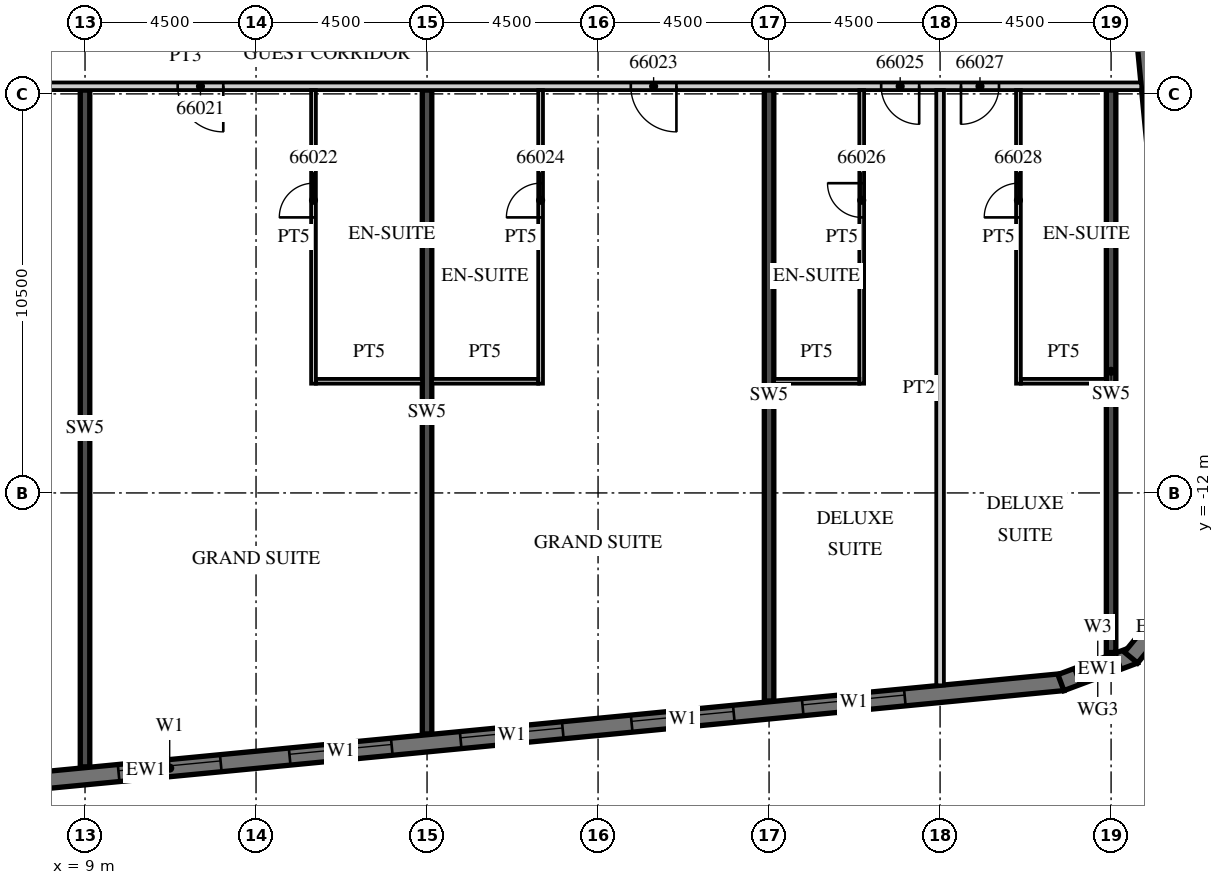
"""IFC4 building model, lengths in metres.
Left out: names, types, materials, properties, quantities, classifications, styles, units other than length and angle.
Written with IfcOpenShell. Run it as: python <this file> out.ifc"""

import sys

from ifc_helpers import new_model, si_unit, direction, frame, frame_2d, origin, place, context, subcontext, project, spatial, polyline, rectangle, outline, extrude, element, fill, save


model = new_model("IFC4")
c1 = context("Model", 3, precision=1e-05, world=origin(), true_north=direction((0.0, 1.0)))
c2 = subcontext(c1, "Body", "Model", "MODEL_VIEW")
j1 = project(units=[si_unit("LENGTHUNIT", "METRE"), si_unit("PLANEANGLEUNIT", "RADIAN")], contexts=[c1])
p1 = place(None, origin())
s1 = spatial("IfcSite", under=j1, at=p1, CompositionType="ELEMENT")
p2 = place(p1, origin())
s2 = spatial("IfcBuilding", under=s1, at=p2, CompositionType="ELEMENT")
p3 = place(p2, frame((0.0, 0.0, 268.5)))
s3 = spatial("IfcBuildingStorey", under=s2, at=p3, CompositionType="ELEMENT", Elevation=268.5)
p4 = place(p3, frame((9.0, -19.207, 0.0), z_axis=(0.0, 0.0, 1.0), x_axis=(0.0, 1.0, 0.0)))
e1 = element("IfcWall", 1, at=p4, inside=s3, PredefinedType="SHEAR", context=c2, shape_type="SweptSolid", body=[
    extrude(rectangle(XDim=17.807, YDim=0.25, at=frame_2d((8.904, 0.0))), origin(), (0.0, 0.0, 1.0), 3.3),
])
p5 = place(p3, frame((18.0, -18.341, 0.0), z_axis=(0.0, 0.0, 1.0), x_axis=(0.0, 1.0, 0.0)))
e2 = element("IfcWall", 2, at=p5, inside=s3, PredefinedType="SHEAR", context=c2, shape_type="SweptSolid", body=[
    extrude(rectangle(XDim=16.941, YDim=0.25, at=frame_2d((8.47, 0.0))), origin(), (0.0, 0.0, 1.0), 3.3),
])
p6 = place(p3, frame((27.0, -17.474, 0.0), z_axis=(0.0, 0.0, 1.0), x_axis=(0.0, 1.0, 0.0)))
e3 = element("IfcWall", 3, at=p6, inside=s3, PredefinedType="SHEAR", context=c2, shape_type="SweptSolid", body=[
    extrude(rectangle(XDim=16.074, YDim=0.25, at=frame_2d((8.037, 0.0))), origin(), (0.0, 0.0, 1.0), 3.3),
])
p7 = place(p3, frame((36.0, -16.199, 0.0), z_axis=(0.0, 0.0, 1.0), x_axis=(0.0, 1.0, 0.0)))
e4 = element("IfcWall", 4, at=p7, inside=s3, PredefinedType="SHEAR", context=c2, shape_type="SweptSolid", body=[
    extrude(rectangle(XDim=14.799, YDim=0.25, at=frame_2d((7.399, 0.0))), origin(), (0.0, 0.0, 1.0), 3.3),
])
p8 = place(p3, frame((-13.521, -21.624, 0.0), z_axis=(0.0, 0.0, 1.0), x_axis=(0.995396186218, 0.095845878695, 0.0)))
e5 = element("IfcWall", 5, at=p8, inside=s3, PredefinedType="SOLIDWALL", context=c2, shape_type="SweptSolid", body=[
    extrude(rectangle(XDim=48.481, YDim=0.45, at=frame_2d((24.241, 0.0))), origin(), (0.0, 0.0, 1.0), 3.02),
])
p9 = place(p8, frame((0.91, 0.0, 0.45)))
e6 = element("IfcOpeningElement", 6, at=p9, cuts=e5, PredefinedType="OPENING", context=c2, shape_type="SweptSolid", body=[
    extrude(rectangle(XDim=2.7, YDim=2.25, at=frame_2d((1.35, 1.125))), frame((0.0, 0.235, 0.0), z_axis=(0.0, -1.0, 0.0), x_axis=(1.0, 0.0, 0.0)), (0.0, 0.0, 1.0), 0.47),
])
p10 = place(p8, frame((5.431, 0.0, 0.45)))
e7 = element("IfcOpeningElement", 7, at=p10, cuts=e5, PredefinedType="OPENING", context=c2, shape_type="SweptSolid", body=[
    extrude(rectangle(XDim=2.7, YDim=2.25, at=frame_2d((1.35, 1.125))), frame((0.0, 0.235, 0.0), z_axis=(0.0, -1.0, 0.0), x_axis=(1.0, 0.0, 0.0)), (0.0, 0.0, 1.0), 0.47),
])
p11 = place(p8, frame((9.952, 0.0, 0.45)))
e8 = element("IfcOpeningElement", 8, at=p11, cuts=e5, PredefinedType="OPENING", context=c2, shape_type="SweptSolid", body=[
    extrude(rectangle(XDim=2.7, YDim=2.25, at=frame_2d((1.35, 1.125))), frame((0.0, 0.235, 0.0), z_axis=(0.0, -1.0, 0.0), x_axis=(1.0, 0.0, 0.0)), (0.0, 0.0, 1.0), 0.47),
])
p12 = place(p8, frame((14.473, 0.0, 0.45)))
e9 = element("IfcOpeningElement", 9, at=p12, cuts=e5, PredefinedType="OPENING", context=c2, shape_type="SweptSolid", body=[
    extrude(rectangle(XDim=2.7, YDim=2.25, at=frame_2d((1.35, 1.125))), frame((0.0, 0.235, 0.0), z_axis=(0.0, -1.0, 0.0), x_axis=(1.0, 0.0, 0.0)), (0.0, 0.0, 1.0), 0.47),
])
p13 = place(p8, frame((18.994, 0.0, 0.45)))
e10 = element("IfcOpeningElement", 10, at=p13, cuts=e5, PredefinedType="OPENING", context=c2, shape_type="SweptSolid", body=[
    extrude(rectangle(XDim=2.7, YDim=2.25, at=frame_2d((1.35, 1.125))), frame((0.0, 0.235, 0.0), z_axis=(0.0, -1.0, 0.0), x_axis=(1.0, 0.0, 0.0)), (0.0, 0.0, 1.0), 0.47),
])
p14 = place(p8, frame((23.514, 0.0, 0.45)))
e11 = element("IfcOpeningElement", 11, at=p14, cuts=e5, PredefinedType="OPENING", context=c2, shape_type="SweptSolid", body=[
    extrude(rectangle(XDim=2.7, YDim=2.25, at=frame_2d((1.35, 1.125))), frame((0.0, 0.235, 0.0), z_axis=(0.0, -1.0, 0.0), x_axis=(1.0, 0.0, 0.0)), (0.0, 0.0, 1.0), 0.47),
])
p15 = place(p8, frame((28.035, 0.0, 0.45)))
e12 = element("IfcOpeningElement", 12, at=p15, cuts=e5, PredefinedType="OPENING", context=c2, shape_type="SweptSolid", body=[
    extrude(rectangle(XDim=2.7, YDim=2.25, at=frame_2d((1.35, 1.125))), frame((0.0, 0.235, 0.0), z_axis=(0.0, -1.0, 0.0), x_axis=(1.0, 0.0, 0.0)), (0.0, 0.0, 1.0), 0.47),
])
p16 = place(p8, frame((32.556, 0.0, 0.45)))
e13 = element("IfcOpeningElement", 13, at=p16, cuts=e5, PredefinedType="OPENING", context=c2, shape_type="SweptSolid", body=[
    extrude(rectangle(XDim=2.7, YDim=2.25, at=frame_2d((1.35, 1.125))), frame((0.0, 0.235, 0.0), z_axis=(0.0, -1.0, 0.0), x_axis=(1.0, 0.0, 0.0)), (0.0, 0.0, 1.0), 0.47),
])
p17 = place(p8, frame((37.077, 0.0, 0.45)))
e14 = element("IfcOpeningElement", 14, at=p17, cuts=e5, PredefinedType="OPENING", context=c2, shape_type="SweptSolid", body=[
    extrude(rectangle(XDim=2.7, YDim=2.25, at=frame_2d((1.35, 1.125))), frame((0.0, 0.235, 0.0), z_axis=(0.0, -1.0, 0.0), x_axis=(1.0, 0.0, 0.0)), (0.0, 0.0, 1.0), 0.47),
])
p18 = place(p8, frame((41.598, 0.0, 0.45)))
e15 = element("IfcOpeningElement", 15, at=p18, cuts=e5, PredefinedType="OPENING", context=c2, shape_type="SweptSolid", body=[
    extrude(rectangle(XDim=2.7, YDim=2.25, at=frame_2d((1.35, 1.125))), frame((0.0, 0.235, 0.0), z_axis=(0.0, -1.0, 0.0), x_axis=(1.0, 0.0, 0.0)), (0.0, 0.0, 1.0), 0.47),
])
p19 = place(p3, frame((34.679, -16.99, 0.0), z_axis=(0.0, 0.0, 1.0), x_axis=(0.936677599948, 0.350192909346, 0.0)))
e16 = element("IfcWall", 16, at=p19, inside=s3, PredefinedType="SOLIDWALL", context=c2, shape_type="SweptSolid", body=[
    extrude(outline(polyline([(0.0, -0.225), (2.071, -0.225), (1.95, 0.225), (0.121, 0.225), (0.0, -0.225)])), origin(), (0.0, 0.0, 1.0), 3.02),
])
p20 = place(p19, frame((0.435, 0.0, 0.45)))
e17 = element("IfcOpeningElement", 17, at=p20, cuts=e16, PredefinedType="OPENING", context=c2, shape_type="SweptSolid", body=[
    extrude(rectangle(XDim=1.2, YDim=2.25, at=frame_2d((0.6, 1.125))), frame((0.0, 0.235, 0.0), z_axis=(0.0, -1.0, 0.0), x_axis=(1.0, 0.0, 0.0)), (0.0, 0.0, 1.0), 0.47),
])
p21 = place(p3, frame((36.524, -16.333, 0.0), z_axis=(0.0, 0.0, 1.0), x_axis=(0.636046112757, 0.771651049663, 0.0)))
e18 = element("IfcWall", 18, at=p21, inside=s3, PredefinedType="SOLIDWALL", context=c2, shape_type="SweptSolid", body=[
    extrude(outline(polyline([(0.0, -0.225), (2.071, -0.225), (1.95, 0.225), (0.121, 0.225), (0.0, -0.225)])), origin(), (0.0, 0.0, 1.0), 3.02),
])
p22 = place(p3, frame((38.132, -12.858, 0.0), z_axis=(0.0, 0.0, 1.0), x_axis=(-0.095847749461, 0.995396006082, 0.0)))
e19 = element("IfcWall", 19, at=p22, inside=s3, PredefinedType="SOLIDWALL", context=c2, shape_type="SweptSolid", body=[
    extrude(rectangle(XDim=32.0, YDim=0.45, at=frame_2d((16.0, 0.0))), origin(), (0.0, 0.0, 1.0), 3.02),
])
p23 = place(p3, frame((-13.5, -1.3, 0.0), z_axis=(0.0, 0.0, 1.0), x_axis=(1.0, 0.0, 0.0)))
e20 = element("IfcWall", 20, at=p23, inside=s3, PredefinedType="PARTITIONING", context=c2, shape_type="SweptSolid", body=[
    extrude(rectangle(XDim=50.293, YDim=0.2, at=frame_2d((25.146, 0.0))), origin(), (0.0, 0.0, 1.0), 3.02),
])
p24 = place(p23, frame((0.575, 0.0, 0.0)))
e21 = element("IfcOpeningElement", 21, at=p24, cuts=e20, PredefinedType="OPENING", context=c2, shape_type="SweptSolid", body=[
    extrude(rectangle(XDim=1.0, YDim=2.1, at=frame_2d((0.5, 1.05))), frame((0.0, 0.11, 0.0), z_axis=(0.0, -1.0, 0.0), x_axis=(1.0, 0.0, 0.0)), (0.0, 0.0, 1.0), 0.22),
])
p25 = place(p23, frame((6.938, 0.0, 0.0)))
e22 = element("IfcOpeningElement", 22, at=p25, cuts=e20, PredefinedType="OPENING", context=c2, shape_type="SweptSolid", body=[
    extrude(rectangle(XDim=1.2, YDim=2.1, at=frame_2d((0.6, 1.05))), frame((0.0, 0.11, 0.0), z_axis=(0.0, -1.0, 0.0), x_axis=(1.0, 0.0, 0.0)), (0.0, 0.0, 1.0), 0.22),
])
p26 = place(p23, frame((18.862, 0.0, 0.0)))
e23 = element("IfcOpeningElement", 23, at=p26, cuts=e20, PredefinedType="OPENING", context=c2, shape_type="SweptSolid", body=[
    extrude(rectangle(XDim=1.2, YDim=2.1, at=frame_2d((0.6, 1.05))), frame((0.0, 0.11, 0.0), z_axis=(0.0, -1.0, 0.0), x_axis=(1.0, 0.0, 0.0)), (0.0, 0.0, 1.0), 0.22),
])
p27 = place(p23, frame((24.938, 0.0, 0.0)))
e24 = element("IfcOpeningElement", 24, at=p27, cuts=e20, PredefinedType="OPENING", context=c2, shape_type="SweptSolid", body=[
    extrude(rectangle(XDim=1.2, YDim=2.1, at=frame_2d((0.6, 1.05))), frame((0.0, 0.11, 0.0), z_axis=(0.0, -1.0, 0.0), x_axis=(1.0, 0.0, 0.0)), (0.0, 0.0, 1.0), 0.22),
])
p28 = place(p23, frame((36.862, 0.0, 0.0)))
e25 = element("IfcOpeningElement", 25, at=p28, cuts=e20, PredefinedType="OPENING", context=c2, shape_type="SweptSolid", body=[
    extrude(rectangle(XDim=1.2, YDim=2.1, at=frame_2d((0.6, 1.05))), frame((0.0, 0.11, 0.0), z_axis=(0.0, -1.0, 0.0), x_axis=(1.0, 0.0, 0.0)), (0.0, 0.0, 1.0), 0.22),
])
p29 = place(p23, frame((43.45, 0.0, 0.0)))
e26 = element("IfcOpeningElement", 26, at=p29, cuts=e20, PredefinedType="OPENING", context=c2, shape_type="SweptSolid", body=[
    extrude(rectangle(XDim=1.0, YDim=2.1, at=frame_2d((0.5, 1.05))), frame((0.0, 0.11, 0.0), z_axis=(0.0, -1.0, 0.0), x_axis=(1.0, 0.0, 0.0)), (0.0, 0.0, 1.0), 0.22),
])
p30 = place(p23, frame((45.55, 0.0, 0.0)))
e27 = element("IfcOpeningElement", 27, at=p30, cuts=e20, PredefinedType="OPENING", context=c2, shape_type="SweptSolid", body=[
    extrude(rectangle(XDim=1.0, YDim=2.1, at=frame_2d((0.5, 1.05))), frame((0.0, 0.11, 0.0), z_axis=(0.0, -1.0, 0.0), x_axis=(1.0, 0.0, 0.0)), (0.0, 0.0, 1.0), 0.22),
])
p31 = place(p3, frame((15.012, -9.125, 0.0), z_axis=(0.0, 0.0, 1.0), x_axis=(0.0, 1.0, 0.0)))
e28 = element("IfcWall", 28, at=p31, inside=s3, PredefinedType="PARTITIONING", context=c2, shape_type="SweptSolid", body=[
    extrude(rectangle(XDim=7.725, YDim=0.125, at=frame_2d((3.863, 0.0))), origin(), (0.0, 0.0, 1.0), 3.02),
])
p32 = place(p31, frame((4.375, 0.0, 0.0)))
e29 = element("IfcOpeningElement", 29, at=p32, cuts=e28, PredefinedType="OPENING", context=c2, shape_type="SweptSolid", body=[
    extrude(rectangle(XDim=0.9, YDim=2.1, at=frame_2d((0.45, 1.05))), frame((0.0, 0.073, 0.0), z_axis=(0.0, -1.0, 0.0), x_axis=(1.0, 0.0, 0.0)), (0.0, 0.0, 1.0), 0.145),
])
p33 = place(p3, frame((15.075, -9.062, 0.0), z_axis=(0.0, 0.0, 1.0), x_axis=(1.0, 0.0, 0.0)))
e30 = element("IfcWall", 30, at=p33, inside=s3, PredefinedType="PARTITIONING", context=c2, shape_type="SweptSolid", body=[
    extrude(rectangle(XDim=2.8, YDim=0.125, at=frame_2d((1.4, 0.0))), origin(), (0.0, 0.0, 1.0), 3.02),
])
p34 = place(p3, frame((20.988, -9.125, 0.0), z_axis=(0.0, 0.0, 1.0), x_axis=(0.0, 1.0, 0.0)))
e31 = element("IfcWall", 31, at=p34, inside=s3, PredefinedType="PARTITIONING", context=c2, shape_type="SweptSolid", body=[
    extrude(rectangle(XDim=7.725, YDim=0.125, at=frame_2d((3.863, 0.0))), origin(), (0.0, 0.0, 1.0), 3.02),
])
p35 = place(p34, frame((4.375, 0.0, 0.0)))
e32 = element("IfcOpeningElement", 32, at=p35, cuts=e31, PredefinedType="OPENING", context=c2, shape_type="SweptSolid", body=[
    extrude(rectangle(XDim=0.9, YDim=2.1, at=frame_2d((0.45, 1.05))), frame((0.0, 0.073, 0.0), z_axis=(0.0, -1.0, 0.0), x_axis=(1.0, 0.0, 0.0)), (0.0, 0.0, 1.0), 0.145),
])
p36 = place(p3, frame((18.125, -9.062, 0.0), z_axis=(0.0, 0.0, 1.0), x_axis=(1.0, 0.0, 0.0)))
e33 = element("IfcWall", 33, at=p36, inside=s3, PredefinedType="PARTITIONING", context=c2, shape_type="SweptSolid", body=[
    extrude(rectangle(XDim=2.8, YDim=0.125, at=frame_2d((1.4, 0.0))), origin(), (0.0, 0.0, 1.0), 3.02),
])
p37 = place(p3, frame((31.5, -17.063, 0.0), z_axis=(0.0, 0.0, 1.0), x_axis=(0.0, 1.0, 0.0)))
e34 = element("IfcWall", 34, at=p37, inside=s3, PredefinedType="PARTITIONING", context=c2, shape_type="SweptSolid", body=[
    extrude(rectangle(XDim=15.663, YDim=0.2, at=frame_2d((7.832, 0.0))), origin(), (0.0, 0.0, 1.0), 3.02),
])
p38 = place(p3, frame((29.438, -9.125, 0.0), z_axis=(0.0, 0.0, 1.0), x_axis=(0.0, 1.0, 0.0)))
e35 = element("IfcWall", 35, at=p38, inside=s3, PredefinedType="PARTITIONING", context=c2, shape_type="SweptSolid", body=[
    extrude(rectangle(XDim=7.725, YDim=0.125, at=frame_2d((3.863, 0.0))), origin(), (0.0, 0.0, 1.0), 3.02),
])
p39 = place(p38, frame((4.375, 0.0, 0.0)))
e36 = element("IfcOpeningElement", 36, at=p39, cuts=e35, PredefinedType="OPENING", context=c2, shape_type="SweptSolid", body=[
    extrude(rectangle(XDim=0.9, YDim=2.1, at=frame_2d((0.45, 1.05))), frame((0.0, 0.073, 0.0), z_axis=(0.0, -1.0, 0.0), x_axis=(1.0, 0.0, 0.0)), (0.0, 0.0, 1.0), 0.145),
])
p40 = place(p3, frame((27.125, -9.062, 0.0), z_axis=(0.0, 0.0, 1.0), x_axis=(1.0, 0.0, 0.0)))
e37 = element("IfcWall", 37, at=p40, inside=s3, PredefinedType="PARTITIONING", context=c2, shape_type="SweptSolid", body=[
    extrude(rectangle(XDim=2.25, YDim=0.125, at=frame_2d((1.125, 0.0))), origin(), (0.0, 0.0, 1.0), 3.02),
])
p41 = place(p3, frame((33.562, -9.125, 0.0), z_axis=(0.0, 0.0, 1.0), x_axis=(0.0, 1.0, 0.0)))
e38 = element("IfcWall", 38, at=p41, inside=s3, PredefinedType="PARTITIONING", context=c2, shape_type="SweptSolid", body=[
    extrude(rectangle(XDim=7.725, YDim=0.125, at=frame_2d((3.863, 0.0))), origin(), (0.0, 0.0, 1.0), 3.02),
])
p42 = place(p41, frame((4.375, 0.0, 0.0)))
e39 = element("IfcOpeningElement", 39, at=p42, cuts=e38, PredefinedType="OPENING", context=c2, shape_type="SweptSolid", body=[
    extrude(rectangle(XDim=0.9, YDim=2.1, at=frame_2d((0.45, 1.05))), frame((0.0, 0.073, 0.0), z_axis=(0.0, -1.0, 0.0), x_axis=(1.0, 0.0, 0.0)), (0.0, 0.0, 1.0), 0.145),
])
p43 = place(p3, frame((33.625, -9.062, 0.0), z_axis=(0.0, 0.0, 1.0), x_axis=(1.0, 0.0, 0.0)))
e40 = element("IfcWall", 40, at=p43, inside=s3, PredefinedType="PARTITIONING", context=c2, shape_type="SweptSolid", body=[
    extrude(rectangle(XDim=2.25, YDim=0.125, at=frame_2d((1.125, 0.0))), origin(), (0.0, 0.0, 1.0), 3.02),
])
p44 = place(p14, origin())
e41 = element("IfcWindow", 41, at=p44, inside=s3, PartitioningType="SINGLE_PANEL", PredefinedType="WINDOW", context=c2, shape_type="SweptSolid", body=[
    extrude(rectangle(XDim=2.7, YDim=2.25, at=frame_2d((1.35, 1.125))), frame((0.0, 0.09, 0.0), z_axis=(0.0, -1.0, 0.0), x_axis=(1.0, 0.0, 0.0)), (0.0, 0.0, 1.0), 0.06),
])
fill(e11, e41)
p45 = place(p15, origin())
e42 = element("IfcWindow", 42, at=p45, inside=s3, PartitioningType="SINGLE_PANEL", PredefinedType="WINDOW", context=c2, shape_type="SweptSolid", body=[
    extrude(rectangle(XDim=2.7, YDim=2.25, at=frame_2d((1.35, 1.125))), frame((0.0, 0.09, 0.0), z_axis=(0.0, -1.0, 0.0), x_axis=(1.0, 0.0, 0.0)), (0.0, 0.0, 1.0), 0.06),
])
fill(e12, e42)
p46 = place(p16, origin())
e43 = element("IfcWindow", 43, at=p46, inside=s3, PartitioningType="SINGLE_PANEL", PredefinedType="WINDOW", context=c2, shape_type="SweptSolid", body=[
    extrude(rectangle(XDim=2.7, YDim=2.25, at=frame_2d((1.35, 1.125))), frame((0.0, 0.09, 0.0), z_axis=(0.0, -1.0, 0.0), x_axis=(1.0, 0.0, 0.0)), (0.0, 0.0, 1.0), 0.06),
])
fill(e13, e43)
p47 = place(p17, origin())
e44 = element("IfcWindow", 44, at=p47, inside=s3, PartitioningType="SINGLE_PANEL", PredefinedType="WINDOW", context=c2, shape_type="SweptSolid", body=[
    extrude(rectangle(XDim=2.7, YDim=2.25, at=frame_2d((1.35, 1.125))), frame((0.0, 0.09, 0.0), z_axis=(0.0, -1.0, 0.0), x_axis=(1.0, 0.0, 0.0)), (0.0, 0.0, 1.0), 0.06),
])
fill(e14, e44)
p48 = place(p18, origin())
e45 = element("IfcWindow", 45, at=p48, inside=s3, PartitioningType="SINGLE_PANEL", PredefinedType="WINDOW", context=c2, shape_type="SweptSolid", body=[
    extrude(rectangle(XDim=2.7, YDim=2.25, at=frame_2d((1.35, 1.125))), frame((0.0, 0.09, 0.0), z_axis=(0.0, -1.0, 0.0), x_axis=(1.0, 0.0, 0.0)), (0.0, 0.0, 1.0), 0.06),
])
fill(e15, e45)
p49 = place(p20, origin())
e46 = element("IfcWindow", 46, at=p49, inside=s3, PartitioningType="SINGLE_PANEL", PredefinedType="WINDOW", context=c2, shape_type="SweptSolid", body=[
    extrude(rectangle(XDim=1.2, YDim=2.25, at=frame_2d((0.6, 1.125))), frame((0.0, 0.09, 0.0), z_axis=(0.0, -1.0, 0.0), x_axis=(1.0, 0.0, 0.0)), (0.0, 0.0, 1.0), 0.06),
])
fill(e17, e46)
p50 = place(p27, origin())
e47 = element("IfcDoor", 47, at=p50, inside=s3, OperationType="SINGLE_SWING_RIGHT", PredefinedType="DOOR", context=c2, shape_type="SweptSolid", body=[
    extrude(rectangle(XDim=1.2, YDim=2.1, at=frame_2d((0.6, 1.05))), frame((0.0, 0.025, 0.0), z_axis=(0.0, -1.0, 0.0), x_axis=(1.0, 0.0, 0.0)), (0.0, 0.0, 1.0), 0.05),
])
fill(e24, e47)
p51 = place(p32, origin())
e48 = element("IfcDoor", 48, at=p51, inside=s3, OperationType="SINGLE_SWING_LEFT", PredefinedType="DOOR", context=c2, shape_type="SweptSolid", body=[
    extrude(rectangle(XDim=0.9, YDim=2.1, at=frame_2d((0.45, 1.05))), frame((0.0, 0.025, 0.0), z_axis=(0.0, -1.0, 0.0), x_axis=(1.0, 0.0, 0.0)), (0.0, 0.0, 1.0), 0.05),
])
fill(e29, e48)
p52 = place(p28, origin())
e49 = element("IfcDoor", 49, at=p52, inside=s3, OperationType="SINGLE_SWING_RIGHT", PredefinedType="DOOR", context=c2, shape_type="SweptSolid", body=[
    extrude(rectangle(XDim=1.2, YDim=2.1, at=frame_2d((0.6, 1.05))), frame((0.0, 0.025, 0.0), z_axis=(0.0, -1.0, 0.0), x_axis=(1.0, 0.0, 0.0)), (0.0, 0.0, 1.0), 0.05),
])
fill(e25, e49)
p53 = place(p35, origin())
e50 = element("IfcDoor", 50, at=p53, inside=s3, OperationType="SINGLE_SWING_LEFT", PredefinedType="DOOR", context=c2, shape_type="SweptSolid", body=[
    extrude(rectangle(XDim=0.9, YDim=2.1, at=frame_2d((0.45, 1.05))), frame((0.0, 0.025, 0.0), z_axis=(0.0, -1.0, 0.0), x_axis=(1.0, 0.0, 0.0)), (0.0, 0.0, 1.0), 0.05),
])
fill(e32, e50)
p54 = place(p29, origin())
e51 = element("IfcDoor", 51, at=p54, inside=s3, OperationType="SINGLE_SWING_RIGHT", PredefinedType="DOOR", context=c2, shape_type="SweptSolid", body=[
    extrude(rectangle(XDim=1.0, YDim=2.1, at=frame_2d((0.5, 1.05))), frame((0.0, 0.025, 0.0), z_axis=(0.0, -1.0, 0.0), x_axis=(1.0, 0.0, 0.0)), (0.0, 0.0, 1.0), 0.05),
])
fill(e26, e51)
p55 = place(p39, origin())
e52 = element("IfcDoor", 52, at=p55, inside=s3, OperationType="SINGLE_SWING_RIGHT", PredefinedType="DOOR", context=c2, shape_type="SweptSolid", body=[
    extrude(rectangle(XDim=0.9, YDim=2.1, at=frame_2d((0.45, 1.05))), frame((0.0, 0.025, 0.0), z_axis=(0.0, -1.0, 0.0), x_axis=(1.0, 0.0, 0.0)), (0.0, 0.0, 1.0), 0.05),
])
fill(e36, e52)
p56 = place(p30, origin())
e53 = element("IfcDoor", 53, at=p56, inside=s3, OperationType="SINGLE_SWING_LEFT", PredefinedType="DOOR", context=c2, shape_type="SweptSolid", body=[
    extrude(rectangle(XDim=1.0, YDim=2.1, at=frame_2d((0.5, 1.05))), frame((0.0, 0.025, 0.0), z_axis=(0.0, -1.0, 0.0), x_axis=(1.0, 0.0, 0.0)), (0.0, 0.0, 1.0), 0.05),
])
fill(e27, e53)
p57 = place(p42, origin())
e54 = element("IfcDoor", 54, at=p57, inside=s3, OperationType="SINGLE_SWING_LEFT", PredefinedType="DOOR", context=c2, shape_type="SweptSolid", body=[
    extrude(rectangle(XDim=0.9, YDim=2.1, at=frame_2d((0.45, 1.05))), frame((0.0, 0.025, 0.0), z_axis=(0.0, -1.0, 0.0), x_axis=(1.0, 0.0, 0.0)), (0.0, 0.0, 1.0), 0.05),
])
fill(e39, e54)
save(model, sys.argv[1])
